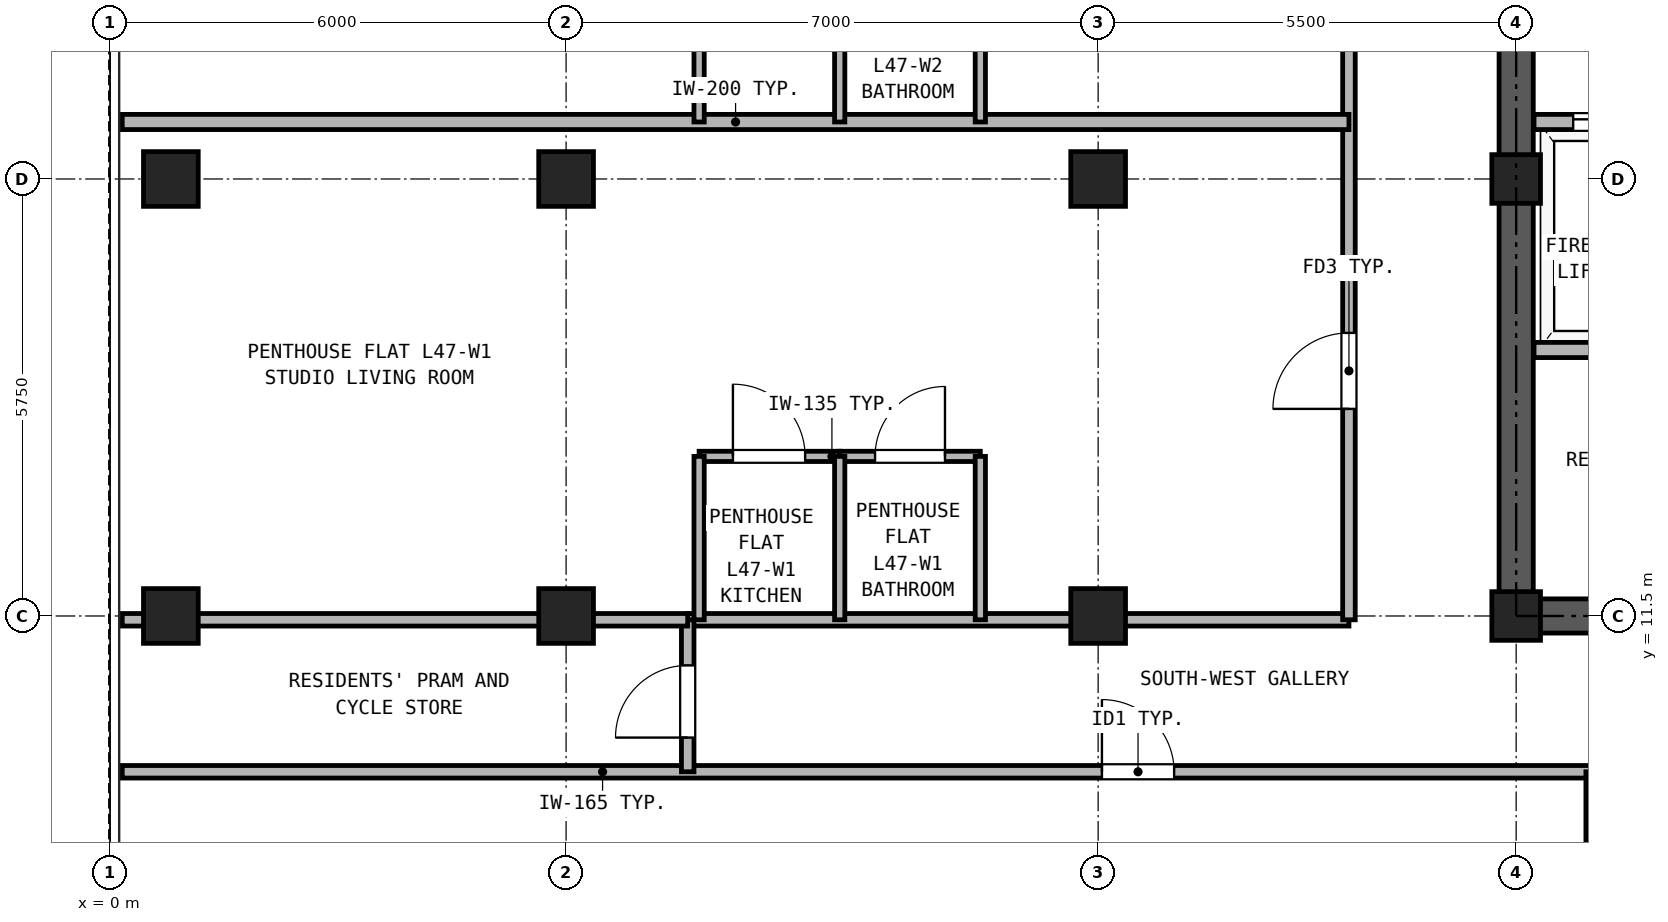
"""IFC4 building model, lengths in metres.
Left out: names, types, materials, properties, quantities, classifications, styles, units other than length and angle.
Written with IfcOpenShell. Run it as: python <this file> out.ifc"""

import sys

from ifc_helpers import new_model, si_unit, direction, frame, frame_2d, origin, origin_2d, place, context, subcontext, project, spatial, rectangle, hollow_rectangle, extrude, source, transform, mapped, element, fill, save


model = new_model("IFC4")
c1 = context("Model", 3, precision=1e-05, world=origin(), true_north=direction((0.0, 1.0)))
c2 = subcontext(c1, "Body", "Model", "MODEL_VIEW")
j1 = project(units=[si_unit("LENGTHUNIT", "METRE"), si_unit("PLANEANGLEUNIT", "RADIAN")], contexts=[c1])
p1 = place(None, origin())
s1 = spatial("IfcSite", under=j1, at=p1, CompositionType="ELEMENT")
p2 = place(p1, origin())
s2 = spatial("IfcBuilding", under=s1, at=p2, CompositionType="ELEMENT")
p3 = place(p2, frame((0.0, 0.0, 168.9)))
s3 = spatial("IfcBuildingStorey", under=s2, at=p3, CompositionType="ELEMENT", Elevation=168.9)
m1 = source(origin(), c2, "Body", "SweptSolid", [
    extrude(hollow_rectangle(XDim=0.72, YDim=0.72, WallThickness=0.04, at=origin_2d()), origin(), (0.0, 0.0, 1.0), 2.95),
])
for number, where, z_axis, x_axis in (
    (1, (0.8, 11.5, 0.0), (0.0, 0.0, 1.0), (1.0, 0.0, 0.0)),
    (2, (0.8, 17.25, 0.0), (0.0, 0.0, 1.0), (1.0, 0.0, 0.0)),
    (3, (6.0, 11.5, 0.0), (0.0, 0.0, 1.0), (1.0, 0.0, 0.0)),
    (4, (6.0, 17.25, 0.0), (0.0, 0.0, 1.0), (1.0, 0.0, 0.0)),
    (5, (13.0, 11.5, 0.0), (0.0, 0.0, 1.0), (1.0, 0.0, 0.0)),
    (6, (13.0, 17.25, 0.0), (0.0, 0.0, 1.0), (1.0, 0.0, 0.0)),
):
    element("IfcColumn", number, at=place(p3, frame(where, z_axis=z_axis, x_axis=x_axis)), inside=s3, PredefinedType="COLUMN", context=c2, shape_type="MappedRepresentation", body=[
        mapped(m1, transform((0.0, 0.0, 0.0), x_axis=(1.0, 0.0, 0.0), y_axis=(0.0, 1.0, 0.0), z_axis=(0.0, 0.0, 1.0), scale=1.0)),
    ])
m2 = source(origin(), c2, "Body", "SweptSolid", [
    extrude(hollow_rectangle(XDim=0.64, YDim=0.64, WallThickness=0.035, at=origin_2d()), origin(), (0.0, 0.0, 1.0), 2.95),
])
for number, where, z_axis, x_axis in (
    (7, (18.5, 11.5, 0.0), (0.0, 0.0, 1.0), (1.0, 0.0, 0.0)),
    (8, (18.5, 17.25, 0.0), (0.0, 0.0, 1.0), (1.0, 0.0, 0.0)),
):
    element("IfcColumn", number, at=place(p3, frame(where, z_axis=z_axis, x_axis=x_axis)), inside=s3, PredefinedType="COLUMN", context=c2, shape_type="MappedRepresentation", body=[
        mapped(m2, transform((0.0, 0.0, 0.0), x_axis=(1.0, 0.0, 0.0), y_axis=(0.0, 1.0, 0.0), z_axis=(0.0, 0.0, 1.0), scale=1.0)),
    ])
p4 = place(p3, frame((18.275, 11.5, 0.0), z_axis=(0.0, 0.0, 1.0), x_axis=(1.0, 0.0, 0.0)))
e9 = element("IfcWall", 9, at=p4, inside=s3, PredefinedType="SHEAR", context=c2, shape_type="SweptSolid", body=[
    extrude(rectangle(XDim=10.45, YDim=0.45, at=frame_2d((5.225, 0.0))), origin(), (0.0, 0.0, 1.0), 2.95),
])
p5 = place(p4, frame((1.825, 0.0, 0.0)))
e10 = element("IfcOpeningElement", 10, at=p5, cuts=e9, PredefinedType="OPENING", context=c2, shape_type="SweptSolid", body=[
    extrude(rectangle(XDim=0.95, YDim=2.15, at=frame_2d((0.475, 1.075))), frame((0.0, 0.235, 0.0), z_axis=(0.0, -1.0, 0.0), x_axis=(1.0, 0.0, 0.0)), (0.0, 0.0, 1.0), 0.47),
])
p6 = place(p4, frame((5.325, 0.0, 0.0)))
e11 = element("IfcOpeningElement", 11, at=p6, cuts=e9, PredefinedType="OPENING", context=c2, shape_type="SweptSolid", body=[
    extrude(rectangle(XDim=0.95, YDim=2.15, at=frame_2d((0.475, 1.075))), frame((0.0, 0.235, 0.0), z_axis=(0.0, -1.0, 0.0), x_axis=(1.0, 0.0, 0.0)), (0.0, 0.0, 1.0), 0.47),
])
p7 = place(p4, frame((8.225, 0.0, 0.0)))
e12 = element("IfcOpeningElement", 12, at=p7, cuts=e9, PredefinedType="OPENING", context=c2, shape_type="SweptSolid", body=[
    extrude(rectangle(XDim=1.1, YDim=2.25, at=frame_2d((0.55, 1.125))), frame((0.0, 0.235, 0.0), z_axis=(0.0, -1.0, 0.0), x_axis=(1.0, 0.0, 0.0)), (0.0, 0.0, 1.0), 0.47),
])
p8 = place(p3, frame((18.5, 11.725, 0.0), z_axis=(0.0, 0.0, 1.0), x_axis=(0.0, 1.0, 0.0)))
e13 = element("IfcWall", 13, at=p8, inside=s3, PredefinedType="SHEAR", context=c2, shape_type="SweptSolid", body=[
    extrude(rectangle(XDim=16.8, YDim=0.45, at=frame_2d((8.4, 0.0))), origin(), (0.0, 0.0, 1.0), 2.95),
])
p9 = place(p8, frame((7.425, 0.0, 0.0)))
e14 = element("IfcOpeningElement", 14, at=p9, cuts=e13, PredefinedType="OPENING", context=c2, shape_type="SweptSolid", body=[
    extrude(rectangle(XDim=1.15, YDim=2.2, at=frame_2d((0.575, 1.1))), frame((0.0, 0.235, 0.0), z_axis=(0.0, -1.0, 0.0), x_axis=(1.0, 0.0, 0.0)), (0.0, 0.0, 1.0), 0.47),
])
p10 = place(p3, frame((18.735, 18.0, 0.0), z_axis=(0.0, 0.0, 1.0), x_axis=(1.0, 0.0, 0.0)))
e15 = element("IfcWall", 15, at=p10, inside=s3, PredefinedType="PARTITIONING", context=c2, shape_type="SweptSolid", body=[
    extrude(rectangle(XDim=9.53, YDim=0.2, at=frame_2d((4.765, 0.0))), origin(), (0.0, 0.0, 1.0), 2.95),
])
p11 = place(p10, frame((0.515, 0.0, 0.0)))
e16 = element("IfcOpeningElement", 16, at=p11, cuts=e15, PredefinedType="OPENING", context=c2, shape_type="SweptSolid", body=[
    extrude(rectangle(XDim=1.3, YDim=2.3, at=frame_2d((0.65, 1.15))), frame((0.0, 0.11, 0.0), z_axis=(0.0, -1.0, 0.0), x_axis=(1.0, 0.0, 0.0)), (0.0, 0.0, 1.0), 0.22),
])
p12 = place(p10, frame((2.615, 0.0, 0.0)))
e17 = element("IfcOpeningElement", 17, at=p12, cuts=e15, PredefinedType="OPENING", context=c2, shape_type="SweptSolid", body=[
    extrude(rectangle(XDim=1.3, YDim=2.3, at=frame_2d((0.65, 1.15))), frame((0.0, 0.11, 0.0), z_axis=(0.0, -1.0, 0.0), x_axis=(1.0, 0.0, 0.0)), (0.0, 0.0, 1.0), 0.22),
])
p13 = place(p10, frame((7.115, 0.0, 0.0)))
e18 = element("IfcOpeningElement", 18, at=p13, cuts=e15, PredefinedType="OPENING", context=c2, shape_type="SweptSolid", body=[
    extrude(rectangle(XDim=1.0, YDim=2.15, at=frame_2d((0.5, 1.075))), frame((0.0, 0.11, 0.0), z_axis=(0.0, -1.0, 0.0), x_axis=(1.0, 0.0, 0.0)), (0.0, 0.0, 1.0), 0.22),
])
p14 = place(p3, frame((18.735, 15.0, 0.0), z_axis=(0.0, 0.0, 1.0), x_axis=(1.0, 0.0, 0.0)))
e19 = element("IfcWall", 19, at=p14, inside=s3, PredefinedType="PARTITIONING", context=c2, shape_type="SweptSolid", body=[
    extrude(rectangle(XDim=9.53, YDim=0.2, at=frame_2d((4.765, 0.0))), origin(), (0.0, 0.0, 1.0), 2.95),
])
p15 = place(p3, frame((0.16, 9.45, 0.0), z_axis=(0.0, 0.0, 1.0), x_axis=(1.0, 0.0, 0.0)))
e20 = element("IfcWall", 20, at=p15, inside=s3, PredefinedType="PARTITIONING", context=c2, shape_type="SweptSolid", body=[
    extrude(rectangle(XDim=41.48, YDim=0.165, at=frame_2d((20.74, 0.0))), origin(), (0.0, 0.0, 1.0), 2.95),
])
p16 = place(p15, frame((12.89, 0.0, 0.0)))
e21 = element("IfcOpeningElement", 21, at=p16, cuts=e20, PredefinedType="OPENING", context=c2, shape_type="SweptSolid", body=[
    extrude(rectangle(XDim=0.95, YDim=2.15, at=frame_2d((0.475, 1.075))), frame((0.0, 0.093, 0.0), z_axis=(0.0, -1.0, 0.0), x_axis=(1.0, 0.0, 0.0)), (0.0, 0.0, 1.0), 0.185),
])
p17 = place(p15, frame((23.34, 0.0, 0.0)))
e22 = element("IfcOpeningElement", 22, at=p17, cuts=e20, PredefinedType="OPENING", context=c2, shape_type="SweptSolid", body=[
    extrude(rectangle(XDim=0.95, YDim=2.15, at=frame_2d((0.475, 1.075))), frame((0.0, 0.093, 0.0), z_axis=(0.0, -1.0, 0.0), x_axis=(1.0, 0.0, 0.0)), (0.0, 0.0, 1.0), 0.185),
])
p18 = place(p15, frame((30.34, 0.0, 0.0)))
e23 = element("IfcOpeningElement", 23, at=p18, cuts=e20, PredefinedType="OPENING", context=c2, shape_type="SweptSolid", body=[
    extrude(rectangle(XDim=0.95, YDim=2.15, at=frame_2d((0.475, 1.075))), frame((0.0, 0.093, 0.0), z_axis=(0.0, -1.0, 0.0), x_axis=(1.0, 0.0, 0.0)), (0.0, 0.0, 1.0), 0.185),
])
p19 = place(p15, frame((35.19, 0.0, 0.0)))
e24 = element("IfcOpeningElement", 24, at=p19, cuts=e20, PredefinedType="OPENING", context=c2, shape_type="SweptSolid", body=[
    extrude(rectangle(XDim=0.95, YDim=2.15, at=frame_2d((0.475, 1.075))), frame((0.0, 0.093, 0.0), z_axis=(0.0, -1.0, 0.0), x_axis=(1.0, 0.0, 0.0)), (0.0, 0.0, 1.0), 0.185),
])
p20 = place(p3, frame((7.6, 11.45, 0.0), z_axis=(0.0, 0.0, 1.0), x_axis=(1.0, 0.0, 0.0)))
e25 = element("IfcWall", 25, at=p20, inside=s3, PredefinedType="PARTITIONING", context=c2, shape_type="SweptSolid", body=[
    extrude(rectangle(XDim=8.7, YDim=0.165, at=frame_2d((4.35, 0.0))), origin(), (0.0, 0.0, 1.0), 2.323),
])
p21 = place(p3, frame((7.6, 9.45, 0.0), z_axis=(0.0, 0.0, 1.0), x_axis=(0.0, 1.0, 0.0)))
e26 = element("IfcWall", 26, at=p21, inside=s3, PredefinedType="PARTITIONING", context=c2, shape_type="SweptSolid", body=[
    extrude(rectangle(XDim=2.0, YDim=0.165, at=frame_2d((1.0, 0.0))), origin(), (0.0, 0.0, 1.0), 2.95),
])
p22 = place(p21, frame((0.45, 0.0, 0.0)))
e27 = element("IfcOpeningElement", 27, at=p22, cuts=e26, PredefinedType="OPENING", context=c2, shape_type="SweptSolid", body=[
    extrude(rectangle(XDim=0.95, YDim=2.15, at=frame_2d((0.475, 1.075))), frame((0.0, 0.093, 0.0), z_axis=(0.0, -1.0, 0.0), x_axis=(1.0, 0.0, 0.0)), (0.0, 0.0, 1.0), 0.185),
])
p23 = place(p3, frame((16.3, 11.45, 0.0), z_axis=(0.0, 0.0, 1.0), x_axis=(0.0, 1.0, 0.0)))
e28 = element("IfcWall", 28, at=p23, inside=s3, PredefinedType="PARTITIONING", context=c2, shape_type="SweptSolid", body=[
    extrude(rectangle(XDim=23.69, YDim=0.165, at=frame_2d((11.845, 0.0))), origin(), (0.0, 0.0, 1.0), 2.95),
])
p24 = place(p23, frame((2.775, 0.0, 0.0)))
e29 = element("IfcOpeningElement", 29, at=p24, cuts=e28, PredefinedType="OPENING", context=c2, shape_type="SweptSolid", body=[
    extrude(rectangle(XDim=1.0, YDim=2.15, at=frame_2d((0.5, 1.075))), frame((0.0, 0.093, 0.0), z_axis=(0.0, -1.0, 0.0), x_axis=(1.0, 0.0, 0.0)), (0.0, 0.0, 1.0), 0.185),
])
p25 = place(p23, frame((10.3, 0.0, 0.0)))
e30 = element("IfcOpeningElement", 30, at=p25, cuts=e28, PredefinedType="OPENING", context=c2, shape_type="SweptSolid", body=[
    extrude(rectangle(XDim=1.0, YDim=2.15, at=frame_2d((0.5, 1.075))), frame((0.0, 0.093, 0.0), z_axis=(0.0, -1.0, 0.0), x_axis=(1.0, 0.0, 0.0)), (0.0, 0.0, 1.0), 0.185),
])
p26 = place(p23, frame((16.575, 0.0, 0.0)))
e31 = element("IfcOpeningElement", 31, at=p26, cuts=e28, PredefinedType="OPENING", context=c2, shape_type="SweptSolid", body=[
    extrude(rectangle(XDim=1.0, YDim=2.15, at=frame_2d((0.5, 1.075))), frame((0.0, 0.093, 0.0), z_axis=(0.0, -1.0, 0.0), x_axis=(1.0, 0.0, 0.0)), (0.0, 0.0, 1.0), 0.185),
])
p27 = place(p3, frame((19.5, 0.16, 0.0), z_axis=(0.0, 0.0, 1.0), x_axis=(0.0, 1.0, 0.0)))
e32 = element("IfcWall", 32, at=p27, inside=s3, PredefinedType="PARTITIONING", context=c2, shape_type="SweptSolid", body=[
    extrude(rectangle(XDim=9.29, YDim=0.165, at=frame_2d((4.645, 0.0))), origin(), (0.0, 0.0, 1.0), 2.95),
])
p28 = place(p3, frame((0.16, 11.45, 0.0), z_axis=(0.0, 0.0, 1.0), x_axis=(1.0, 0.0, 0.0)))
e33 = element("IfcWall", 33, at=p28, inside=s3, PredefinedType="PARTITIONING", context=c2, shape_type="SweptSolid", body=[
    extrude(rectangle(XDim=7.44, YDim=0.165, at=frame_2d((3.72, 0.0))), origin(), (0.0, 0.0, 1.0), 2.323),
])
p29 = place(p3, frame((7.75, 13.6, 0.0), z_axis=(0.0, 0.0, 1.0), x_axis=(1.0, 0.0, 0.0)))
e34 = element("IfcWall", 34, at=p29, inside=s3, PredefinedType="PARTITIONING", context=c2, shape_type="SweptSolid", body=[
    extrude(rectangle(XDim=1.85, YDim=0.135, at=frame_2d((0.925, 0.0))), origin(), (0.0, 0.0, 1.0), 2.95),
])
p30 = place(p29, frame((0.445, 0.0, 0.0)))
e35 = element("IfcOpeningElement", 35, at=p30, cuts=e34, PredefinedType="OPENING", context=c2, shape_type="SweptSolid", body=[
    extrude(rectangle(XDim=0.95, YDim=2.15, at=frame_2d((0.475, 1.075))), frame((0.0, 0.077, 0.0), z_axis=(0.0, -1.0, 0.0), x_axis=(1.0, 0.0, 0.0)), (0.0, 0.0, 1.0), 0.155),
])
p31 = place(p3, frame((9.6, 13.6, 0.0), z_axis=(0.0, 0.0, 1.0), x_axis=(1.0, 0.0, 0.0)))
e36 = element("IfcWall", 36, at=p31, inside=s3, PredefinedType="PARTITIONING", context=c2, shape_type="SweptSolid", body=[
    extrude(rectangle(XDim=1.85, YDim=0.135, at=frame_2d((0.925, 0.0))), origin(), (0.0, 0.0, 1.0), 2.95),
])
p32 = place(p31, frame((0.465, 0.0, 0.0)))
e37 = element("IfcOpeningElement", 37, at=p32, cuts=e36, PredefinedType="OPENING", context=c2, shape_type="SweptSolid", body=[
    extrude(rectangle(XDim=0.92, YDim=2.1, at=frame_2d((0.46, 1.05))), frame((0.0, 0.077, 0.0), z_axis=(0.0, -1.0, 0.0), x_axis=(1.0, 0.0, 0.0)), (0.0, 0.0, 1.0), 0.155),
])
for number, where, z_axis, x_axis in (
    (38, (7.75, 11.45, 0.0), (0.0, 0.0, 1.0), (0.0, 1.0, 0.0)),
    (39, (9.6, 11.45, 0.0), (0.0, 0.0, 1.0), (0.0, 1.0, 0.0)),
    (40, (11.45, 11.45, 0.0), (0.0, 0.0, 1.0), (0.0, 1.0, 0.0)),
):
    element("IfcWall", number, at=place(p3, frame(where, z_axis=z_axis, x_axis=x_axis)), inside=s3, PredefinedType="PARTITIONING", context=c2, shape_type="SweptSolid", body=[
        extrude(rectangle(XDim=2.15, YDim=0.135, at=frame_2d((1.075, 0.0))), origin(), (0.0, 0.0, 1.0), 2.95),
    ])
p33 = place(p3, frame((0.16, 18.0, 0.0), z_axis=(0.0, 0.0, 1.0), x_axis=(1.0, 0.0, 0.0)))
e41 = element("IfcWall", 41, at=p33, inside=s3, PredefinedType="PARTITIONING", context=c2, shape_type="SweptSolid", body=[
    extrude(rectangle(XDim=16.14, YDim=0.2, at=frame_2d((8.07, 0.0))), origin(), (0.0, 0.0, 1.0), 2.95),
])
for number, where, z_axis, x_axis in (
    (42, (7.75, 18.0, 0.0), (0.0, 0.0, 1.0), (0.0, 1.0, 0.0)),
    (43, (9.6, 18.0, 0.0), (0.0, 0.0, 1.0), (0.0, 1.0, 0.0)),
    (44, (11.45, 18.0, 0.0), (0.0, 0.0, 1.0), (0.0, 1.0, 0.0)),
):
    element("IfcWall", number, at=place(p3, frame(where, z_axis=z_axis, x_axis=x_axis)), inside=s3, PredefinedType="PARTITIONING", context=c2, shape_type="SweptSolid", body=[
        extrude(rectangle(XDim=2.15, YDim=0.135, at=frame_2d((1.075, 0.0))), origin(), (0.0, 0.0, 1.0), 2.95),
    ])
p34 = place(p11, origin())
e45 = element("IfcDoor", 45, at=p34, inside=s3, OperationType="DOUBLE_DOOR_SLIDING", PredefinedType="DOOR", context=c2, shape_type="SweptSolid", body=[
    extrude(rectangle(XDim=1.3, YDim=2.3, at=frame_2d((0.65, 1.15))), frame((0.0, 0.025, 0.0), z_axis=(0.0, -1.0, 0.0), x_axis=(1.0, 0.0, 0.0)), (0.0, 0.0, 1.0), 0.05),
])
fill(e16, e45)
p35 = place(p16, frame((0.95, 0.0, 0.0), z_axis=(0.0, 0.0, 1.0), x_axis=(-1.0, 0.0, 0.0)))
e46 = element("IfcDoor", 46, at=p35, inside=s3, OperationType="SINGLE_SWING_LEFT", PredefinedType="DOOR", context=c2, shape_type="SweptSolid", body=[
    extrude(rectangle(XDim=0.95, YDim=2.15, at=frame_2d((0.475, 1.075))), frame((0.0, 0.025, 0.0), z_axis=(0.0, -1.0, 0.0), x_axis=(1.0, 0.0, 0.0)), (0.0, 0.0, 1.0), 0.05),
])
fill(e21, e46)
p36 = place(p22, frame((0.95, 0.0, 0.0), z_axis=(0.0, 0.0, 1.0), x_axis=(-1.0, 0.0, 0.0)))
e47 = element("IfcDoor", 47, at=p36, inside=s3, OperationType="SINGLE_SWING_LEFT", PredefinedType="DOOR", context=c2, shape_type="SweptSolid", body=[
    extrude(rectangle(XDim=0.95, YDim=2.15, at=frame_2d((0.475, 1.075))), frame((0.0, 0.025, 0.0), z_axis=(0.0, -1.0, 0.0), x_axis=(1.0, 0.0, 0.0)), (0.0, 0.0, 1.0), 0.05),
])
fill(e27, e47)
p37 = place(p30, origin())
e48 = element("IfcDoor", 48, at=p37, inside=s3, OperationType="SINGLE_SWING_LEFT", PredefinedType="DOOR", context=c2, shape_type="SweptSolid", body=[
    extrude(rectangle(XDim=0.95, YDim=2.15, at=frame_2d((0.475, 1.075))), frame((0.0, 0.025, 0.0), z_axis=(0.0, -1.0, 0.0), x_axis=(1.0, 0.0, 0.0)), (0.0, 0.0, 1.0), 0.05),
])
fill(e35, e48)
p38 = place(p32, origin())
e49 = element("IfcDoor", 49, at=p38, inside=s3, OperationType="SINGLE_SWING_RIGHT", PredefinedType="DOOR", context=c2, shape_type="SweptSolid", body=[
    extrude(rectangle(XDim=0.92, YDim=2.1, at=frame_2d((0.46, 1.05))), frame((0.0, 0.025, 0.0), z_axis=(0.0, -1.0, 0.0), x_axis=(1.0, 0.0, 0.0)), (0.0, 0.0, 1.0), 0.05),
])
fill(e37, e49)
p39 = place(p24, origin())
e50 = element("IfcDoor", 50, at=p39, inside=s3, OperationType="SINGLE_SWING_LEFT", PredefinedType="DOOR", context=c2, shape_type="SweptSolid", body=[
    extrude(rectangle(XDim=1.0, YDim=2.15, at=frame_2d((0.5, 1.075))), frame((0.0, 0.025, 0.0), z_axis=(0.0, -1.0, 0.0), x_axis=(1.0, 0.0, 0.0)), (0.0, 0.0, 1.0), 0.05),
])
fill(e29, e50)
save(model, sys.argv[1])
